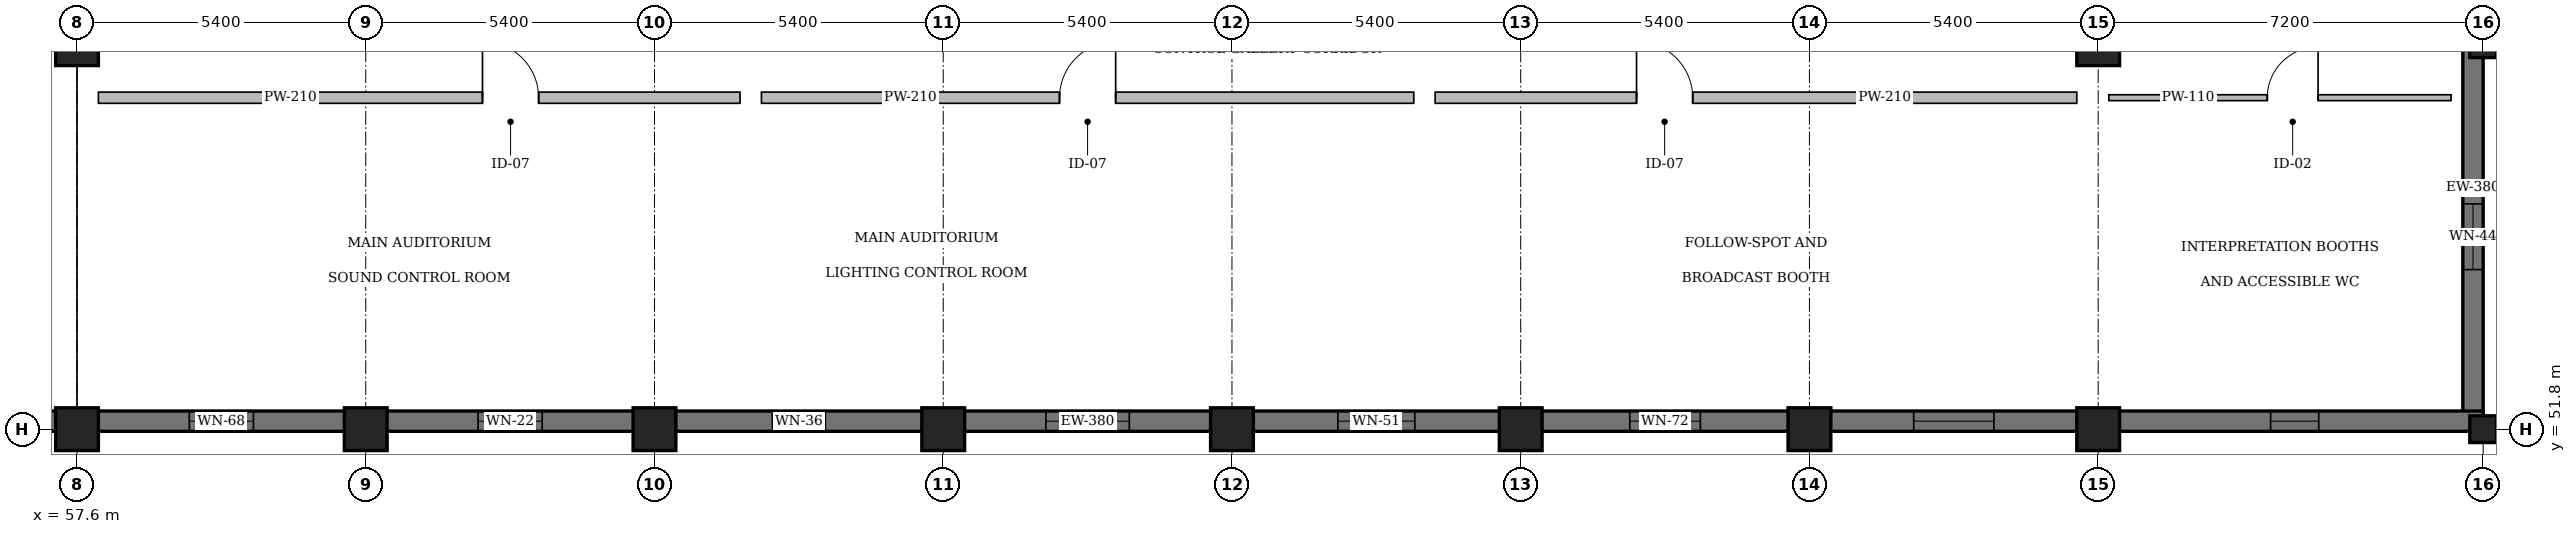
"""IFC4 building model, lengths in metres.
Left out: names, types, materials, properties, quantities, classifications, styles, units other than length and angle.
Written with IfcOpenShell. Run it as: python <this file> out.ifc"""

import sys

from ifc_helpers import new_model, si_unit, direction, frame, frame_2d, origin, origin_2d, place, context, subcontext, project, spatial, rectangle, extrude, element, fill, save


model = new_model("IFC4")
c1 = context("Model", 3, precision=1e-05, world=origin(), true_north=direction((0.0, 1.0)))
c2 = subcontext(c1, "Body", "Model", "MODEL_VIEW")
j1 = project(units=[si_unit("LENGTHUNIT", "METRE"), si_unit("PLANEANGLEUNIT", "RADIAN")], contexts=[c1])
p1 = place(None, origin())
s1 = spatial("IfcSite", under=j1, at=p1, CompositionType="ELEMENT")
p2 = place(p1, origin())
s2 = spatial("IfcBuilding", under=s1, at=p2, CompositionType="ELEMENT")
p3 = place(p2, frame((0.0, 0.0, 13.2)))
s3 = spatial("IfcBuildingStorey", under=s2, at=p3, CompositionType="ELEMENT", Elevation=13.2)
p4 = place(p3, frame((68.4, 51.8, 0.0), z_axis=(0.0, 0.0, 1.0), x_axis=(1.0, 0.0, 0.0)))
e1 = element("IfcColumn", 1, at=p4, inside=s3, PredefinedType="COLUMN", context=c2, shape_type="SweptSolid", body=[
    extrude(rectangle(XDim=0.8, YDim=0.8, at=origin_2d()), origin(), (0.0, 0.0, 1.0), 7.44),
])
for number, where, z_axis, x_axis in (
    (2, (73.8, 51.8, 0.0), (0.0, 0.0, 1.0), (1.0, 0.0, 0.0)),
    (3, (79.2, 51.8, 0.0), (0.0, 0.0, 1.0), (1.0, 0.0, 0.0)),
):
    element("IfcColumn", number, at=place(p3, frame(where, z_axis=z_axis, x_axis=x_axis)), inside=s3, PredefinedType="COLUMN", context=c2, shape_type="SweptSolid", body=[
        extrude(rectangle(XDim=0.8, YDim=0.8, at=origin_2d()), origin(), (0.0, 0.0, 1.0), 8.699),
    ])
p5 = place(p3, frame((84.6, 51.8, 0.0), z_axis=(0.0, 0.0, 1.0), x_axis=(1.0, 0.0, 0.0)))
e4 = element("IfcColumn", 4, at=p5, inside=s3, PredefinedType="COLUMN", context=c2, shape_type="SweptSolid", body=[
    extrude(rectangle(XDim=0.8, YDim=0.8, at=origin_2d()), origin(), (0.0, 0.0, 1.0), 7.44),
])
p6 = place(p3, frame((90.0, 51.8, 0.0), z_axis=(0.0, 0.0, 1.0), x_axis=(1.0, 0.0, 0.0)))
e5 = element("IfcColumn", 5, at=p6, inside=s3, PredefinedType="COLUMN", context=c2, shape_type="SweptSolid", body=[
    extrude(rectangle(XDim=0.8, YDim=0.8, at=origin_2d()), origin(), (0.0, 0.0, 1.0), 5.705),
])
p7 = place(p3, frame((95.4, 51.8, 0.0), z_axis=(0.0, 0.0, 1.0), x_axis=(1.0, 0.0, 0.0)))
e6 = element("IfcColumn", 6, at=p7, inside=s3, PredefinedType="COLUMN", context=c2, shape_type="SweptSolid", body=[
    extrude(rectangle(XDim=0.8, YDim=0.8, at=origin_2d()), origin(), (0.0, 0.0, 1.0), 3.9),
])
p8 = place(p3, frame((95.4, 59.0, 0.0), z_axis=(0.0, 0.0, 1.0), x_axis=(1.0, 0.0, 0.0)))
e7 = element("IfcColumn", 7, at=p8, inside=s3, PredefinedType="COLUMN", context=c2, shape_type="SweptSolid", body=[
    extrude(rectangle(XDim=0.8, YDim=0.8, at=origin_2d()), origin(), (0.0, 0.0, 1.0), 5.542),
])
for number, where, z_axis, x_axis in (
    (8, (102.6, 51.8, 0.0), (0.0, 0.0, 1.0), (1.0, 0.0, 0.0)),
    (9, (102.6, 59.0, 0.0), (0.0, 0.0, 1.0), (1.0, 0.0, 0.0)),
):
    element("IfcColumn", number, at=place(p3, frame(where, z_axis=z_axis, x_axis=x_axis)), inside=s3, PredefinedType="COLUMN", context=c2, shape_type="SweptSolid", body=[
        extrude(rectangle(XDim=0.5, YDim=0.5, at=origin_2d()), origin(), (0.0, 0.0, 1.0), 3.9),
    ])
p9 = place(p3, frame((57.6, 51.8, 0.0), z_axis=(0.0, 0.0, 1.0), x_axis=(1.0, 0.0, 0.0)))
e10 = element("IfcColumn", 10, at=p9, inside=s3, PredefinedType="COLUMN", context=c2, shape_type="SweptSolid", body=[
    extrude(rectangle(XDim=0.8, YDim=0.8, at=origin_2d()), origin(), (0.0, 0.0, 1.0), 3.9),
])
p10 = place(p3, frame((57.6, 59.0, 0.0), z_axis=(0.0, 0.0, 1.0), x_axis=(1.0, 0.0, 0.0)))
e11 = element("IfcColumn", 11, at=p10, inside=s3, PredefinedType="COLUMN", context=c2, shape_type="SweptSolid", body=[
    extrude(rectangle(XDim=0.8, YDim=0.8, at=origin_2d()), origin(), (0.0, 0.0, 1.0), 5.542),
])
p11 = place(p3, frame((63.0, 51.8, 0.0), z_axis=(0.0, 0.0, 1.0), x_axis=(1.0, 0.0, 0.0)))
e12 = element("IfcColumn", 12, at=p11, inside=s3, PredefinedType="COLUMN", context=c2, shape_type="SweptSolid", body=[
    extrude(rectangle(XDim=0.8, YDim=0.8, at=origin_2d()), origin(), (0.0, 0.0, 1.0), 5.705),
])
p12 = place(p3, frame((102.41, 51.8, 0.0), z_axis=(0.0, 0.0, 1.0), x_axis=(0.0, 1.0, 0.0)))
e13 = element("IfcWall", 13, at=p12, inside=s3, PredefinedType="SOLIDWALL", context=c2, shape_type="SweptSolid", body=[
    extrude(rectangle(XDim=9.04, YDim=0.38, at=frame_2d((4.52, 0.0))), origin(), (0.0, 0.0, 1.0), 3.65),
])
p13 = place(p12, frame((2.985, 0.0, 0.95)))
e14 = element("IfcOpeningElement", 14, at=p13, cuts=e13, PredefinedType="OPENING", context=c2, shape_type="SweptSolid", body=[
    extrude(rectangle(XDim=1.23, YDim=1.65, at=frame_2d((0.615, 0.825))), frame((0.0, 0.21, 0.0), z_axis=(0.0, -1.0, 0.0), x_axis=(1.0, 0.0, 0.0)), (0.0, 0.0, 1.0), 0.42),
])
p14 = place(p3, frame((50.4, 51.95, 0.0), z_axis=(0.0, 0.0, 1.0), x_axis=(1.0, 0.0, 0.0)))
e15 = element("IfcWall", 15, at=p14, inside=s3, PredefinedType="SOLIDWALL", context=c2, shape_type="SweptSolid", body=[
    extrude(rectangle(XDim=52.2, YDim=0.38, at=frame_2d((26.1, 0.0))), origin(), (0.0, 0.0, 1.0), 3.2),
])
p15 = place(p14, frame((2.88, 0.0, 0.95)))
e16 = element("IfcOpeningElement", 16, at=p15, cuts=e15, PredefinedType="OPENING", context=c2, shape_type="SweptSolid", body=[
    extrude(rectangle(XDim=1.29, YDim=1.65, at=frame_2d((0.645, 0.825))), frame((0.0, 0.21, 0.0), z_axis=(0.0, -1.0, 0.0), x_axis=(1.0, 0.0, 0.0)), (0.0, 0.0, 1.0), 0.42),
])
p16 = place(p14, frame((9.3, 0.0, 0.95)))
e17 = element("IfcOpeningElement", 17, at=p16, cuts=e15, PredefinedType="OPENING", context=c2, shape_type="SweptSolid", body=[
    extrude(rectangle(XDim=1.2, YDim=1.9, at=frame_2d((0.6, 0.95))), frame((0.0, 0.21, 0.0), z_axis=(0.0, -1.0, 0.0), x_axis=(1.0, 0.0, 0.0)), (0.0, 0.0, 1.0), 0.42),
])
p17 = place(p14, frame((14.7, 0.0, 0.95)))
e18 = element("IfcOpeningElement", 18, at=p17, cuts=e15, PredefinedType="OPENING", context=c2, shape_type="SweptSolid", body=[
    extrude(rectangle(XDim=1.2, YDim=2.05, at=frame_2d((0.6, 1.025))), frame((0.0, 0.21, 0.0), z_axis=(0.0, -1.0, 0.0), x_axis=(1.0, 0.0, 0.0)), (0.0, 0.0, 1.0), 0.42),
])
p18 = place(p14, frame((20.205, 0.0, 0.95)))
e19 = element("IfcOpeningElement", 19, at=p18, cuts=e15, PredefinedType="OPENING", context=c2, shape_type="SweptSolid", body=[
    extrude(rectangle(XDim=0.99, YDim=1.55, at=frame_2d((0.495, 0.775))), frame((0.0, 0.21, 0.0), z_axis=(0.0, -1.0, 0.0), x_axis=(1.0, 0.0, 0.0)), (0.0, 0.0, 1.0), 0.42),
])
p19 = place(p14, frame((25.32, 0.0, 0.95)))
e20 = element("IfcOpeningElement", 20, at=p19, cuts=e15, PredefinedType="OPENING", context=c2, shape_type="SweptSolid", body=[
    extrude(rectangle(XDim=1.56, YDim=1.75, at=frame_2d((0.78, 0.875))), frame((0.0, 0.21, 0.0), z_axis=(0.0, -1.0, 0.0), x_axis=(1.0, 0.0, 0.0)), (0.0, 0.0, 1.0), 0.42),
])
p20 = place(p14, frame((30.78, 0.0, 0.95)))
e21 = element("IfcOpeningElement", 21, at=p20, cuts=e15, PredefinedType="OPENING", context=c2, shape_type="SweptSolid", body=[
    extrude(rectangle(XDim=1.44, YDim=1.7, at=frame_2d((0.72, 0.85))), frame((0.0, 0.21, 0.0), z_axis=(0.0, -1.0, 0.0), x_axis=(1.0, 0.0, 0.0)), (0.0, 0.0, 1.0), 0.42),
])
p21 = place(p14, frame((36.24, 0.0, 0.95)))
e22 = element("IfcOpeningElement", 22, at=p21, cuts=e15, PredefinedType="OPENING", context=c2, shape_type="SweptSolid", body=[
    extrude(rectangle(XDim=1.32, YDim=1.9, at=frame_2d((0.66, 0.95))), frame((0.0, 0.21, 0.0), z_axis=(0.0, -1.0, 0.0), x_axis=(1.0, 0.0, 0.0)), (0.0, 0.0, 1.0), 0.42),
])
p22 = place(p14, frame((41.55, 0.0, 0.95)))
e23 = element("IfcOpeningElement", 23, at=p22, cuts=e15, PredefinedType="OPENING", context=c2, shape_type="SweptSolid", body=[
    extrude(rectangle(XDim=1.5, YDim=2.0, at=frame_2d((0.75, 1.0))), frame((0.0, 0.21, 0.0), z_axis=(0.0, -1.0, 0.0), x_axis=(1.0, 0.0, 0.0)), (0.0, 0.0, 1.0), 0.42),
])
p23 = place(p14, frame((48.225, 0.0, 0.95)))
e24 = element("IfcOpeningElement", 24, at=p23, cuts=e15, PredefinedType="OPENING", context=c2, shape_type="SweptSolid", body=[
    extrude(rectangle(XDim=0.9, YDim=1.55, at=frame_2d((0.45, 0.775))), frame((0.0, 0.21, 0.0), z_axis=(0.0, -1.0, 0.0), x_axis=(1.0, 0.0, 0.0)), (0.0, 0.0, 1.0), 0.42),
])
p24 = place(p3, frame((58.0, 58.0, 0.0), z_axis=(0.0, 0.0, 1.0), x_axis=(1.0, 0.0, 0.0)))
e25 = element("IfcWall", 25, at=p24, inside=s3, PredefinedType="PARTITIONING", context=c2, shape_type="SweptSolid", body=[
    extrude(rectangle(XDim=12.0, YDim=0.21, at=frame_2d((6.0, 0.0))), origin(), (0.0, 0.0, 1.0), 3.66),
])
p25 = place(p24, frame((7.183, 0.0, 0.0)))
e26 = element("IfcOpeningElement", 26, at=p25, cuts=e25, PredefinedType="OPENING", context=c2, shape_type="SweptSolid", body=[
    extrude(rectangle(XDim=1.05, YDim=2.15, at=frame_2d((0.525, 1.075))), frame((0.0, 0.125, 0.0), z_axis=(0.0, -1.0, 0.0), x_axis=(1.0, 0.0, 0.0)), (0.0, 0.0, 1.0), 0.25),
])
p26 = place(p3, frame((70.4, 58.0, 0.0), z_axis=(0.0, 0.0, 1.0), x_axis=(1.0, 0.0, 0.0)))
e27 = element("IfcWall", 27, at=p26, inside=s3, PredefinedType="PARTITIONING", context=c2, shape_type="SweptSolid", body=[
    extrude(rectangle(XDim=12.2, YDim=0.21, at=frame_2d((6.1, 0.0))), origin(), (0.0, 0.0, 1.0), 3.66),
])
p27 = place(p26, frame((5.575, 0.0, 0.0)))
e28 = element("IfcOpeningElement", 28, at=p27, cuts=e27, PredefinedType="OPENING", context=c2, shape_type="SweptSolid", body=[
    extrude(rectangle(XDim=1.05, YDim=2.15, at=frame_2d((0.525, 1.075))), frame((0.0, 0.125, 0.0), z_axis=(0.0, -1.0, 0.0), x_axis=(1.0, 0.0, 0.0)), (0.0, 0.0, 1.0), 0.25),
])
p28 = place(p3, frame((83.0, 58.0, 0.0), z_axis=(0.0, 0.0, 1.0), x_axis=(1.0, 0.0, 0.0)))
e29 = element("IfcWall", 29, at=p28, inside=s3, PredefinedType="PARTITIONING", context=c2, shape_type="SweptSolid", body=[
    extrude(rectangle(XDim=12.0, YDim=0.21, at=frame_2d((6.0, 0.0))), origin(), (0.0, 0.0, 1.0), 3.66),
])
p29 = place(p28, frame((3.767, 0.0, 0.0)))
e30 = element("IfcOpeningElement", 30, at=p29, cuts=e29, PredefinedType="OPENING", context=c2, shape_type="SweptSolid", body=[
    extrude(rectangle(XDim=1.05, YDim=2.15, at=frame_2d((0.525, 1.075))), frame((0.0, 0.125, 0.0), z_axis=(0.0, -1.0, 0.0), x_axis=(1.0, 0.0, 0.0)), (0.0, 0.0, 1.0), 0.25),
])
p30 = place(p3, frame((95.6, 58.0, 0.0), z_axis=(0.0, 0.0, 1.0), x_axis=(1.0, 0.0, 0.0)))
e31 = element("IfcWall", 31, at=p30, inside=s3, PredefinedType="PARTITIONING", context=c2, shape_type="SweptSolid", body=[
    extrude(rectangle(XDim=6.4, YDim=0.11, at=frame_2d((3.2, 0.0))), origin(), (0.0, 0.0, 1.0), 3.66),
])
p31 = place(p30, frame((2.962, 0.0, 0.0)))
e32 = element("IfcOpeningElement", 32, at=p31, cuts=e31, PredefinedType="OPENING", context=c2, shape_type="SweptSolid", body=[
    extrude(rectangle(XDim=0.95, YDim=2.1, at=frame_2d((0.475, 1.05))), frame((0.0, 0.075, 0.0), z_axis=(0.0, -1.0, 0.0), x_axis=(1.0, 0.0, 0.0)), (0.0, 0.0, 1.0), 0.15),
])
p32 = place(p13, origin())
e33 = element("IfcWindow", 33, at=p32, inside=s3, PartitioningType="SINGLE_PANEL", PredefinedType="WINDOW", context=c2, shape_type="SweptSolid", body=[
    extrude(rectangle(XDim=1.23, YDim=1.65, at=frame_2d((0.615, 0.825))), frame((0.0, 0.03, 0.0), z_axis=(0.0, -1.0, 0.0), x_axis=(1.0, 0.0, 0.0)), (0.0, 0.0, 1.0), 0.06),
])
fill(e14, e33)
p33 = place(p16, origin())
e34 = element("IfcWindow", 34, at=p33, inside=s3, PartitioningType="SINGLE_PANEL", PredefinedType="WINDOW", context=c2, shape_type="SweptSolid", body=[
    extrude(rectangle(XDim=1.2, YDim=1.9, at=frame_2d((0.6, 0.95))), frame((0.0, 0.03, 0.0), z_axis=(0.0, -1.0, 0.0), x_axis=(1.0, 0.0, 0.0)), (0.0, 0.0, 1.0), 0.06),
])
fill(e17, e34)
p34 = place(p17, origin())
e35 = element("IfcWindow", 35, at=p34, inside=s3, PartitioningType="SINGLE_PANEL", PredefinedType="WINDOW", context=c2, shape_type="SweptSolid", body=[
    extrude(rectangle(XDim=1.2, YDim=2.05, at=frame_2d((0.6, 1.025))), frame((0.0, 0.03, 0.0), z_axis=(0.0, -1.0, 0.0), x_axis=(1.0, 0.0, 0.0)), (0.0, 0.0, 1.0), 0.06),
])
fill(e18, e35)
p35 = place(p18, origin())
e36 = element("IfcWindow", 36, at=p35, inside=s3, PartitioningType="SINGLE_PANEL", PredefinedType="WINDOW", context=c2, shape_type="SweptSolid", body=[
    extrude(rectangle(XDim=0.99, YDim=1.55, at=frame_2d((0.495, 0.775))), frame((0.0, 0.03, 0.0), z_axis=(0.0, -1.0, 0.0), x_axis=(1.0, 0.0, 0.0)), (0.0, 0.0, 1.0), 0.06),
])
fill(e19, e36)
p36 = place(p19, origin())
e37 = element("IfcWindow", 37, at=p36, inside=s3, PartitioningType="SINGLE_PANEL", PredefinedType="WINDOW", context=c2, shape_type="SweptSolid", body=[
    extrude(rectangle(XDim=1.56, YDim=1.75, at=frame_2d((0.78, 0.875))), frame((0.0, 0.03, 0.0), z_axis=(0.0, -1.0, 0.0), x_axis=(1.0, 0.0, 0.0)), (0.0, 0.0, 1.0), 0.06),
])
fill(e20, e37)
p37 = place(p20, origin())
e38 = element("IfcWindow", 38, at=p37, inside=s3, PartitioningType="SINGLE_PANEL", PredefinedType="WINDOW", context=c2, shape_type="SweptSolid", body=[
    extrude(rectangle(XDim=1.44, YDim=1.7, at=frame_2d((0.72, 0.85))), frame((0.0, 0.03, 0.0), z_axis=(0.0, -1.0, 0.0), x_axis=(1.0, 0.0, 0.0)), (0.0, 0.0, 1.0), 0.06),
])
fill(e21, e38)
p38 = place(p21, origin())
e39 = element("IfcWindow", 39, at=p38, inside=s3, PartitioningType="SINGLE_PANEL", PredefinedType="WINDOW", context=c2, shape_type="SweptSolid", body=[
    extrude(rectangle(XDim=1.32, YDim=1.9, at=frame_2d((0.66, 0.95))), frame((0.0, 0.03, 0.0), z_axis=(0.0, -1.0, 0.0), x_axis=(1.0, 0.0, 0.0)), (0.0, 0.0, 1.0), 0.06),
])
fill(e22, e39)
p39 = place(p22, origin())
e40 = element("IfcWindow", 40, at=p39, inside=s3, PartitioningType="SINGLE_PANEL", PredefinedType="WINDOW", context=c2, shape_type="SweptSolid", body=[
    extrude(rectangle(XDim=1.5, YDim=2.0, at=frame_2d((0.75, 1.0))), frame((0.0, 0.03, 0.0), z_axis=(0.0, -1.0, 0.0), x_axis=(1.0, 0.0, 0.0)), (0.0, 0.0, 1.0), 0.06),
])
fill(e23, e40)
p40 = place(p23, origin())
e41 = element("IfcWindow", 41, at=p40, inside=s3, PartitioningType="SINGLE_PANEL", PredefinedType="WINDOW", context=c2, shape_type="SweptSolid", body=[
    extrude(rectangle(XDim=0.9, YDim=1.55, at=frame_2d((0.45, 0.775))), frame((0.0, 0.03, 0.0), z_axis=(0.0, -1.0, 0.0), x_axis=(1.0, 0.0, 0.0)), (0.0, 0.0, 1.0), 0.06),
])
fill(e24, e41)
p41 = place(p25, origin())
e42 = element("IfcDoor", 42, at=p41, inside=s3, OperationType="SINGLE_SWING_LEFT", PredefinedType="DOOR", context=c2, shape_type="SweptSolid", body=[
    extrude(rectangle(XDim=1.05, YDim=2.15, at=frame_2d((0.525, 1.075))), frame((0.0, 0.025, 0.0), z_axis=(0.0, -1.0, 0.0), x_axis=(1.0, 0.0, 0.0)), (0.0, 0.0, 1.0), 0.05),
])
fill(e26, e42)
p42 = place(p27, origin())
e43 = element("IfcDoor", 43, at=p42, inside=s3, OperationType="SINGLE_SWING_RIGHT", PredefinedType="DOOR", context=c2, shape_type="SweptSolid", body=[
    extrude(rectangle(XDim=1.05, YDim=2.15, at=frame_2d((0.525, 1.075))), frame((0.0, 0.025, 0.0), z_axis=(0.0, -1.0, 0.0), x_axis=(1.0, 0.0, 0.0)), (0.0, 0.0, 1.0), 0.05),
])
fill(e28, e43)
p43 = place(p29, origin())
e44 = element("IfcDoor", 44, at=p43, inside=s3, OperationType="SINGLE_SWING_LEFT", PredefinedType="DOOR", context=c2, shape_type="SweptSolid", body=[
    extrude(rectangle(XDim=1.05, YDim=2.15, at=frame_2d((0.525, 1.075))), frame((0.0, 0.025, 0.0), z_axis=(0.0, -1.0, 0.0), x_axis=(1.0, 0.0, 0.0)), (0.0, 0.0, 1.0), 0.05),
])
fill(e30, e44)
p44 = place(p31, origin())
e45 = element("IfcDoor", 45, at=p44, inside=s3, OperationType="SINGLE_SWING_RIGHT", PredefinedType="DOOR", context=c2, shape_type="SweptSolid", body=[
    extrude(rectangle(XDim=0.95, YDim=2.1, at=frame_2d((0.475, 1.05))), frame((0.0, 0.025, 0.0), z_axis=(0.0, -1.0, 0.0), x_axis=(1.0, 0.0, 0.0)), (0.0, 0.0, 1.0), 0.05),
])
fill(e32, e45)
save(model, sys.argv[1])
